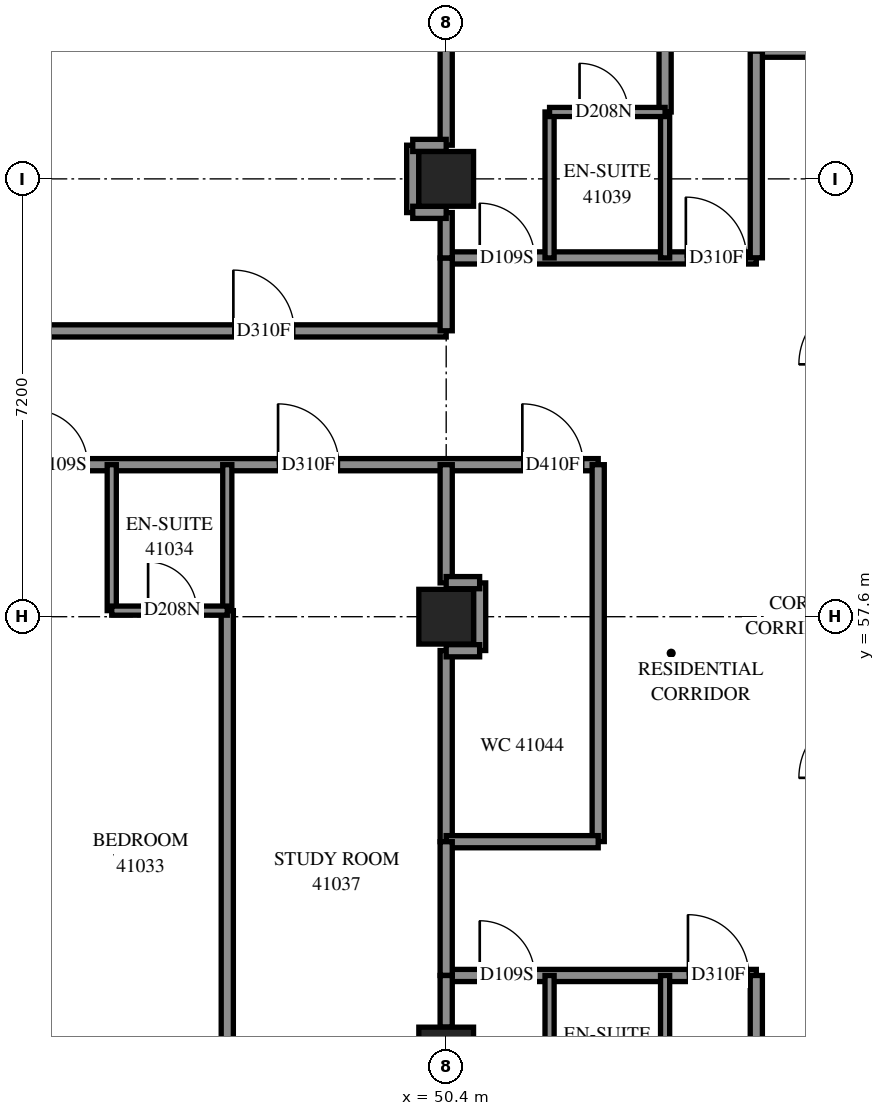
"""IFC4 building model, lengths in metres.
Left out: names, types, materials, properties, quantities, classifications, styles, units other than length and angle.
Written with IfcOpenShell. Run it as: python <this file> out.ifc"""

import sys

from ifc_helpers import new_model, si_unit, direction, frame, frame_2d, origin, origin_2d, place, context, subcontext, project, spatial, rectangle, extrude, element, fill, save


model = new_model("IFC4")
c1 = context("Model", 3, precision=1e-05, world=origin(), true_north=direction((0.0, 1.0)))
c2 = subcontext(c1, "Body", "Model", "MODEL_VIEW")
j1 = project(units=[si_unit("LENGTHUNIT", "METRE"), si_unit("PLANEANGLEUNIT", "RADIAN")], contexts=[c1])
p1 = place(None, origin())
s1 = spatial("IfcSite", under=j1, at=p1, CompositionType="ELEMENT")
p2 = place(p1, origin())
s2 = spatial("IfcBuilding", under=s1, at=p2, CompositionType="ELEMENT")
p3 = place(p2, frame((0.0, 0.0, 152.4)))
s3 = spatial("IfcBuildingStorey", under=s2, at=p3, CompositionType="ELEMENT", Elevation=152.4)
for number, where, z_axis, x_axis in (
    (1, (50.4, 50.4, 0.0), (0.0, 0.0, 1.0), (1.0, 0.0, 0.0)),
    (2, (50.4, 57.6, 0.0), (0.0, 0.0, 1.0), (1.0, 0.0, 0.0)),
    (3, (50.4, 64.8, 0.0), (0.0, 0.0, 1.0), (1.0, 0.0, 0.0)),
):
    element("IfcColumn", number, at=place(p3, frame(where, z_axis=z_axis, x_axis=x_axis)), inside=s3, PredefinedType="COLUMN", context=c2, shape_type="SweptSolid", body=[
        extrude(rectangle(XDim=0.9, YDim=0.9, at=origin_2d()), origin(), (0.0, 0.0, 1.0), 3.1),
    ])
p4 = place(p3, frame((55.5, 66.9, 0.0), z_axis=(0.0, 0.0, 1.0), x_axis=(1.0, 0.0, 0.0)))
e4 = element("IfcWall", 4, at=p4, inside=s3, PredefinedType="PARTITIONING", context=c2, shape_type="SweptSolid", body=[
    extrude(rectangle(XDim=18.6, YDim=0.2, at=frame_2d((9.3, 0.0))), origin(), (0.0, 0.0, 1.0), 3.1),
])
p5 = place(p4, frame((4.4, 0.0, 0.0)))
e5 = element("IfcOpeningElement", 5, at=p5, cuts=e4, PredefinedType="OPENING", context=c2, shape_type="SweptSolid", body=[
    extrude(rectangle(XDim=0.9, YDim=2.1, at=frame_2d((0.45, 1.05))), frame((0.0, 0.11, 0.0), z_axis=(0.0, -1.0, 0.0), x_axis=(1.0, 0.0, 0.0)), (0.0, 0.0, 1.0), 0.22),
])
p6 = place(p4, frame((6.1, 0.0, 0.0)))
e6 = element("IfcOpeningElement", 6, at=p6, cuts=e4, PredefinedType="OPENING", context=c2, shape_type="SweptSolid", body=[
    extrude(rectangle(XDim=0.9, YDim=2.1, at=frame_2d((0.45, 1.05))), frame((0.0, 0.11, 0.0), z_axis=(0.0, -1.0, 0.0), x_axis=(1.0, 0.0, 0.0)), (0.0, 0.0, 1.0), 0.22),
])
p7 = place(p4, frame((11.65, 0.0, 0.0)))
e7 = element("IfcOpeningElement", 7, at=p7, cuts=e4, PredefinedType="OPENING", context=c2, shape_type="SweptSolid", body=[
    extrude(rectangle(XDim=0.9, YDim=2.1, at=frame_2d((0.45, 1.05))), frame((0.0, 0.11, 0.0), z_axis=(0.0, -1.0, 0.0), x_axis=(1.0, 0.0, 0.0)), (0.0, 0.0, 1.0), 0.22),
])
p8 = place(p4, frame((13.3, 0.0, 0.0)))
e8 = element("IfcOpeningElement", 8, at=p8, cuts=e4, PredefinedType="OPENING", context=c2, shape_type="SweptSolid", body=[
    extrude(rectangle(XDim=0.9, YDim=2.1, at=frame_2d((0.45, 1.05))), frame((0.0, 0.11, 0.0), z_axis=(0.0, -1.0, 0.0), x_axis=(1.0, 0.0, 0.0)), (0.0, 0.0, 1.0), 0.22),
])
p9 = place(p3, frame((36.0, 60.1, 0.0), z_axis=(0.0, 0.0, 1.0), x_axis=(1.0, 0.0, 0.0)))
e9 = element("IfcWall", 9, at=p9, inside=s3, PredefinedType="PARTITIONING", context=c2, shape_type="SweptSolid", body=[
    extrude(rectangle(XDim=16.9, YDim=0.2, at=frame_2d((8.45, 0.0))), origin(), (0.0, 0.0, 1.0), 3.1),
])
p10 = place(p9, frame((4.125, 0.0, 0.0)))
e10 = element("IfcOpeningElement", 10, at=p10, cuts=e9, PredefinedType="OPENING", context=c2, shape_type="SweptSolid", body=[
    extrude(rectangle(XDim=1.0, YDim=2.1, at=frame_2d((0.5, 1.05))), frame((0.0, 0.11, 0.0), z_axis=(0.0, -1.0, 0.0), x_axis=(1.0, 0.0, 0.0)), (0.0, 0.0, 1.0), 0.22),
])
p11 = place(p9, frame((7.6, 0.0, 0.0)))
e11 = element("IfcOpeningElement", 11, at=p11, cuts=e9, PredefinedType="OPENING", context=c2, shape_type="SweptSolid", body=[
    extrude(rectangle(XDim=0.9, YDim=2.1, at=frame_2d((0.45, 1.05))), frame((0.0, 0.11, 0.0), z_axis=(0.0, -1.0, 0.0), x_axis=(1.0, 0.0, 0.0)), (0.0, 0.0, 1.0), 0.22),
])
p12 = place(p9, frame((11.635, 0.0, 0.0)))
e12 = element("IfcOpeningElement", 12, at=p12, cuts=e9, PredefinedType="OPENING", context=c2, shape_type="SweptSolid", body=[
    extrude(rectangle(XDim=1.0, YDim=2.1, at=frame_2d((0.5, 1.05))), frame((0.0, 0.11, 0.0), z_axis=(0.0, -1.0, 0.0), x_axis=(1.0, 0.0, 0.0)), (0.0, 0.0, 1.0), 0.22),
])
p13 = place(p9, frame((15.652, 0.0, 0.0)))
e13 = element("IfcOpeningElement", 13, at=p13, cuts=e9, PredefinedType="OPENING", context=c2, shape_type="SweptSolid", body=[
    extrude(rectangle(XDim=1.0, YDim=2.1, at=frame_2d((0.5, 1.05))), frame((0.0, 0.11, 0.0), z_axis=(0.0, -1.0, 0.0), x_axis=(1.0, 0.0, 0.0)), (0.0, 0.0, 1.0), 0.22),
])
p14 = place(p3, frame((40.702, 62.3, 0.0), z_axis=(0.0, 0.0, 1.0), x_axis=(1.0, 0.0, 0.0)))
e14 = element("IfcWall", 14, at=p14, inside=s3, PredefinedType="PARTITIONING", context=c2, shape_type="SweptSolid", body=[
    extrude(rectangle(XDim=9.698, YDim=0.2, at=frame_2d((4.849, 0.0))), origin(), (0.0, 0.0, 1.0), 3.1),
])
p15 = place(p14, frame((6.198, 0.0, 0.0)))
e15 = element("IfcOpeningElement", 15, at=p15, cuts=e14, PredefinedType="OPENING", context=c2, shape_type="SweptSolid", body=[
    extrude(rectangle(XDim=1.0, YDim=2.1, at=frame_2d((0.5, 1.05))), frame((0.0, 0.11, 0.0), z_axis=(0.0, -1.0, 0.0), x_axis=(1.0, 0.0, 0.0)), (0.0, 0.0, 1.0), 0.22),
])
p16 = place(p3, frame((46.8, 49.7, 0.0), z_axis=(0.0, 0.0, 1.0), x_axis=(0.0, 1.0, 0.0)))
e16 = element("IfcWall", 16, at=p16, inside=s3, PredefinedType="PARTITIONING", context=c2, shape_type="SweptSolid", body=[
    extrude(rectangle(XDim=8.0, YDim=0.2, at=frame_2d((4.0, 0.0))), origin(), (0.0, 0.0, 1.0), 3.1),
])
p17 = place(p3, frame((54.0, 65.9, 0.0), z_axis=(0.0, 0.0, 1.0), x_axis=(0.0, 1.0, 0.0)))
e17 = element("IfcWall", 17, at=p17, inside=s3, PredefinedType="PARTITIONING", context=c2, shape_type="SweptSolid", body=[
    extrude(rectangle(XDim=6.851, YDim=0.2, at=frame_2d((3.425, 0.0))), origin(), (0.0, 0.0, 1.0), 3.1),
])
p18 = place(p3, frame((52.9, 53.902, 0.0), z_axis=(0.0, 0.0, 1.0), x_axis=(0.0, 1.0, 0.0)))
e18 = element("IfcWall", 18, at=p18, inside=s3, PredefinedType="PARTITIONING", context=c2, shape_type="SweptSolid", body=[
    extrude(rectangle(XDim=6.198, YDim=0.2, at=frame_2d((3.099, 0.0))), origin(), (0.0, 0.0, 1.0), 3.1),
])
p19 = place(p3, frame((50.4, 65.354, 0.0), z_axis=(0.0, 0.0, 1.0), x_axis=(0.0, 1.0, 0.0)))
e19 = element("IfcWall", 19, at=p19, inside=s3, PredefinedType="PARTITIONING", context=c2, shape_type="SweptSolid", body=[
    extrude(rectangle(XDim=6.092, YDim=0.2, at=frame_2d((3.046, 0.0))), origin(), (0.0, 0.0, 1.0), 3.1),
])
p20 = place(p3, frame((50.4, 51.7, 0.0), z_axis=(0.0, 0.0, 1.0), x_axis=(1.0, 0.0, 0.0)))
e20 = element("IfcWall", 20, at=p20, inside=s3, PredefinedType="PARTITIONING", context=c2, shape_type="SweptSolid", body=[
    extrude(rectangle(XDim=5.1, YDim=0.2, at=frame_2d((2.55, 0.0))), origin(), (0.0, 0.0, 1.0), 3.1),
])
p21 = place(p20, frame((0.552, 0.0, 0.0)))
e21 = element("IfcOpeningElement", 21, at=p21, cuts=e20, PredefinedType="OPENING", context=c2, shape_type="SweptSolid", body=[
    extrude(rectangle(XDim=0.9, YDim=2.1, at=frame_2d((0.45, 1.05))), frame((0.0, 0.11, 0.0), z_axis=(0.0, -1.0, 0.0), x_axis=(1.0, 0.0, 0.0)), (0.0, 0.0, 1.0), 0.22),
])
p22 = place(p20, frame((3.976, 0.0, 0.0)))
e22 = element("IfcOpeningElement", 22, at=p22, cuts=e20, PredefinedType="OPENING", context=c2, shape_type="SweptSolid", body=[
    extrude(rectangle(XDim=1.0, YDim=2.1, at=frame_2d((0.5, 1.05))), frame((0.0, 0.11, 0.0), z_axis=(0.0, -1.0, 0.0), x_axis=(1.0, 0.0, 0.0)), (0.0, 0.0, 1.0), 0.22),
])
p23 = place(p3, frame((50.4, 63.5, 0.0), z_axis=(0.0, 0.0, 1.0), x_axis=(1.0, 0.0, 0.0)))
e23 = element("IfcWall", 23, at=p23, inside=s3, PredefinedType="PARTITIONING", context=c2, shape_type="SweptSolid", body=[
    extrude(rectangle(XDim=5.1, YDim=0.2, at=frame_2d((2.55, 0.0))), origin(), (0.0, 0.0, 1.0), 3.1),
])
p24 = place(p23, frame((0.552, 0.0, 0.0)))
e24 = element("IfcOpeningElement", 24, at=p24, cuts=e23, PredefinedType="OPENING", context=c2, shape_type="SweptSolid", body=[
    extrude(rectangle(XDim=0.9, YDim=2.1, at=frame_2d((0.45, 1.05))), frame((0.0, 0.11, 0.0), z_axis=(0.0, -1.0, 0.0), x_axis=(1.0, 0.0, 0.0)), (0.0, 0.0, 1.0), 0.22),
])
p25 = place(p23, frame((3.941, 0.0, 0.0)))
e25 = element("IfcOpeningElement", 25, at=p25, cuts=e23, PredefinedType="OPENING", context=c2, shape_type="SweptSolid", body=[
    extrude(rectangle(XDim=1.0, YDim=2.1, at=frame_2d((0.5, 1.05))), frame((0.0, 0.11, 0.0), z_axis=(0.0, -1.0, 0.0), x_axis=(1.0, 0.0, 0.0)), (0.0, 0.0, 1.0), 0.22),
])
p26 = place(p3, frame((55.5, 48.3, 0.0), z_axis=(0.0, 0.0, 1.0), x_axis=(0.0, 1.0, 0.0)))
e26 = element("IfcWall", 26, at=p26, inside=s3, PredefinedType="PARTITIONING", context=c2, shape_type="SweptSolid", body=[
    extrude(rectangle(XDim=3.4, YDim=0.2, at=frame_2d((1.7, 0.0))), origin(), (0.0, 0.0, 1.0), 3.1),
])
p27 = place(p3, frame((55.5, 63.502, 0.0), z_axis=(0.0, 0.0, 1.0), x_axis=(0.0, 1.0, 0.0)))
e27 = element("IfcWall", 27, at=p27, inside=s3, PredefinedType="PARTITIONING", context=c2, shape_type="SweptSolid", body=[
    extrude(rectangle(XDim=3.398, YDim=0.2, at=frame_2d((1.699, 0.0))), origin(), (0.0, 0.0, 1.0), 3.1),
])
p28 = place(p3, frame((50.4, 53.9, 0.0), z_axis=(0.0, 0.0, 1.0), x_axis=(0.0, 1.0, 0.0)))
e28 = element("IfcWall", 28, at=p28, inside=s3, PredefinedType="PARTITIONING", context=c2, shape_type="SweptSolid", body=[
    extrude(rectangle(XDim=3.144, YDim=0.2, at=frame_2d((1.572, 0.0))), origin(), (0.0, 0.0, 1.0), 3.1),
])
p29 = place(p3, frame((50.4, 53.9, 0.0), z_axis=(0.0, 0.0, 1.0), x_axis=(1.0, 0.0, 0.0)))
e29 = element("IfcWall", 29, at=p29, inside=s3, PredefinedType="PARTITIONING", context=c2, shape_type="SweptSolid", body=[
    extrude(rectangle(XDim=2.5, YDim=0.2, at=frame_2d((1.25, 0.0))), origin(), (0.0, 0.0, 1.0), 3.1),
])
for number, where, z_axis, x_axis in (
    (30, (52.1, 49.3, 0.0), (0.0, 0.0, 1.0), (0.0, 1.0, 0.0)),
    (31, (52.1, 63.5, 0.0), (0.0, 0.0, 1.0), (0.0, 1.0, 0.0)),
    (32, (54.0, 49.3, 0.0), (0.0, 0.0, 1.0), (0.0, 1.0, 0.0)),
    (33, (54.0, 63.5, 0.0), (0.0, 0.0, 1.0), (0.0, 1.0, 0.0)),
    (34, (44.9, 57.7, 0.0), (0.0, 0.0, 1.0), (0.0, 1.0, 0.0)),
    (35, (46.8, 57.7, 0.0), (0.0, 0.0, 1.0), (0.0, 1.0, 0.0)),
):
    element("IfcWall", number, at=place(p3, frame(where, z_axis=z_axis, x_axis=x_axis)), inside=s3, PredefinedType="PARTITIONING", context=c2, shape_type="SweptSolid", body=[
        extrude(rectangle(XDim=2.4, YDim=0.15, at=frame_2d((1.2, 0.0))), origin(), (0.0, 0.0, 1.0), 3.1),
    ])
p30 = place(p3, frame((50.4, 51.7, 0.0), z_axis=(0.0, 0.0, 1.0), x_axis=(0.0, 1.0, 0.0)))
e36 = element("IfcWall", 36, at=p30, inside=s3, PredefinedType="PARTITIONING", context=c2, shape_type="SweptSolid", body=[
    extrude(rectangle(XDim=2.2, YDim=0.2, at=frame_2d((1.1, 0.0))), origin(), (0.0, 0.0, 1.0), 3.1),
])
p31 = place(p3, frame((50.4, 58.156, 0.0), z_axis=(0.0, 0.0, 1.0), x_axis=(0.0, 1.0, 0.0)))
e37 = element("IfcWall", 37, at=p31, inside=s3, PredefinedType="PARTITIONING", context=c2, shape_type="SweptSolid", body=[
    extrude(rectangle(XDim=1.944, YDim=0.2, at=frame_2d((0.972, 0.0))), origin(), (0.0, 0.0, 1.0), 3.1),
])
p32 = place(p3, frame((44.9, 57.7, 0.0), z_axis=(0.0, 0.0, 1.0), x_axis=(1.0, 0.0, 0.0)))
e38 = element("IfcWall", 38, at=p32, inside=s3, PredefinedType="PARTITIONING", context=c2, shape_type="SweptSolid", body=[
    extrude(rectangle(XDim=1.9, YDim=0.15, at=frame_2d((0.95, 0.0))), origin(), (0.0, 0.0, 1.0), 3.1),
])
p33 = place(p32, frame((0.598, 0.0, 0.0)))
e39 = element("IfcOpeningElement", 39, at=p33, cuts=e38, PredefinedType="OPENING", context=c2, shape_type="SweptSolid", body=[
    extrude(rectangle(XDim=0.8, YDim=2.1, at=frame_2d((0.4, 1.05))), frame((0.0, 0.085, 0.0), z_axis=(0.0, -1.0, 0.0), x_axis=(1.0, 0.0, 0.0)), (0.0, 0.0, 1.0), 0.17),
])
p34 = place(p3, frame((52.1, 65.9, 0.0), z_axis=(0.0, 0.0, 1.0), x_axis=(1.0, 0.0, 0.0)))
e40 = element("IfcWall", 40, at=p34, inside=s3, PredefinedType="PARTITIONING", context=c2, shape_type="SweptSolid", body=[
    extrude(rectangle(XDim=1.9, YDim=0.15, at=frame_2d((0.95, 0.0))), origin(), (0.0, 0.0, 1.0), 3.1),
])
p35 = place(p34, frame((0.493, 0.0, 0.0)))
e41 = element("IfcOpeningElement", 41, at=p35, cuts=e40, PredefinedType="OPENING", context=c2, shape_type="SweptSolid", body=[
    extrude(rectangle(XDim=0.8, YDim=2.1, at=frame_2d((0.4, 1.05))), frame((0.0, 0.085, 0.0), z_axis=(0.0, -1.0, 0.0), x_axis=(1.0, 0.0, 0.0)), (0.0, 0.0, 1.0), 0.17),
])
p36 = place(p3, frame((50.4, 62.302, 0.0), z_axis=(0.0, 0.0, 1.0), x_axis=(0.0, 1.0, 0.0)))
e42 = element("IfcWall", 42, at=p36, inside=s3, PredefinedType="PARTITIONING", context=c2, shape_type="SweptSolid", body=[
    extrude(rectangle(XDim=1.198, YDim=0.2, at=frame_2d((0.599, 0.0))), origin(), (0.0, 0.0, 1.0), 3.1),
])
p37 = place(p3, frame((50.95, 57.044, 0.0), z_axis=(0.0, 0.0, 1.0), x_axis=(0.0, 1.0, 0.0)))
e43 = element("IfcWall", 43, at=p37, inside=s3, PredefinedType="PARTITIONING", context=c2, shape_type="SweptSolid", body=[
    extrude(rectangle(XDim=1.112, YDim=0.2, at=frame_2d((0.556, 0.0))), origin(), (0.0, 0.0, 1.0), 3.1),
])
p38 = place(p3, frame((49.85, 64.246, 0.0), z_axis=(0.0, 0.0, 1.0), x_axis=(0.0, 1.0, 0.0)))
e44 = element("IfcWall", 44, at=p38, inside=s3, PredefinedType="PARTITIONING", context=c2, shape_type="SweptSolid", body=[
    extrude(rectangle(XDim=1.108, YDim=0.2, at=frame_2d((0.554, 0.0))), origin(), (0.0, 0.0, 1.0), 3.1),
])
p39 = place(p3, frame((50.4, 50.85, 0.0), z_axis=(0.0, 0.0, 1.0), x_axis=(0.0, 1.0, 0.0)))
e45 = element("IfcWall", 45, at=p39, inside=s3, PredefinedType="PARTITIONING", context=c2, shape_type="SweptSolid", body=[
    extrude(rectangle(XDim=0.85, YDim=0.2, at=frame_2d((0.425, 0.0))), origin(), (0.0, 0.0, 1.0), 3.1),
])
p40 = place(p3, frame((50.4, 63.5, 0.0), z_axis=(0.0, 0.0, 1.0), x_axis=(0.0, 1.0, 0.0)))
e46 = element("IfcWall", 46, at=p40, inside=s3, PredefinedType="PARTITIONING", context=c2, shape_type="SweptSolid", body=[
    extrude(rectangle(XDim=0.746, YDim=0.2, at=frame_2d((0.373, 0.0))), origin(), (0.0, 0.0, 1.0), 3.1),
])
for number, where, z_axis, x_axis in (
    (47, (50.4, 58.16, 0.0), (0.0, 0.0, 1.0), (1.0, 0.0, 0.0)),
    (48, (50.4, 57.04, 0.0), (0.0, 0.0, 1.0), (1.0, 0.0, 0.0)),
    (49, (49.85, 65.35, 0.0), (0.0, 0.0, 1.0), (1.0, 0.0, 0.0)),
    (50, (49.85, 64.25, 0.0), (0.0, 0.0, 1.0), (1.0, 0.0, 0.0)),
):
    element("IfcWall", number, at=place(p3, frame(where, z_axis=z_axis, x_axis=x_axis)), inside=s3, PredefinedType="PARTITIONING", context=c2, shape_type="SweptSolid", body=[
        extrude(rectangle(XDim=0.55, YDim=0.2, at=frame_2d((0.275, 0.0))), origin(), (0.0, 0.0, 1.0), 3.1),
    ])
p41 = place(p11, origin())
e51 = element("IfcDoor", 51, at=p41, inside=s3, OperationType="SINGLE_SWING_LEFT", PredefinedType="DOOR", context=c2, shape_type="SweptSolid", body=[
    extrude(rectangle(XDim=0.9, YDim=2.1, at=frame_2d((0.45, 1.05))), frame((0.0, 0.025, 0.0), z_axis=(0.0, -1.0, 0.0), x_axis=(1.0, 0.0, 0.0)), (0.0, 0.0, 1.0), 0.05),
])
fill(e11, e51)
p42 = place(p33, origin())
e52 = element("IfcDoor", 52, at=p42, inside=s3, OperationType="SINGLE_SWING_RIGHT", PredefinedType="DOOR", context=c2, shape_type="SweptSolid", body=[
    extrude(rectangle(XDim=0.8, YDim=2.1, at=frame_2d((0.4, 1.05))), frame((0.0, 0.025, 0.0), z_axis=(0.0, -1.0, 0.0), x_axis=(1.0, 0.0, 0.0)), (0.0, 0.0, 1.0), 0.05),
])
fill(e39, e52)
p43 = place(p15, origin())
e53 = element("IfcDoor", 53, at=p43, inside=s3, OperationType="SINGLE_SWING_RIGHT", PredefinedType="DOOR", context=c2, shape_type="SweptSolid", body=[
    extrude(rectangle(XDim=1.0, YDim=2.1, at=frame_2d((0.5, 1.05))), frame((0.0, 0.025, 0.0), z_axis=(0.0, -1.0, 0.0), x_axis=(1.0, 0.0, 0.0)), (0.0, 0.0, 1.0), 0.05),
])
fill(e15, e53)
p44 = place(p12, origin())
e54 = element("IfcDoor", 54, at=p44, inside=s3, OperationType="SINGLE_SWING_RIGHT", PredefinedType="DOOR", context=c2, shape_type="SweptSolid", body=[
    extrude(rectangle(XDim=1.0, YDim=2.1, at=frame_2d((0.5, 1.05))), frame((0.0, 0.025, 0.0), z_axis=(0.0, -1.0, 0.0), x_axis=(1.0, 0.0, 0.0)), (0.0, 0.0, 1.0), 0.05),
])
fill(e12, e54)
p45 = place(p24, origin())
e55 = element("IfcDoor", 55, at=p45, inside=s3, OperationType="SINGLE_SWING_RIGHT", PredefinedType="DOOR", context=c2, shape_type="SweptSolid", body=[
    extrude(rectangle(XDim=0.9, YDim=2.1, at=frame_2d((0.45, 1.05))), frame((0.0, 0.025, 0.0), z_axis=(0.0, -1.0, 0.0), x_axis=(1.0, 0.0, 0.0)), (0.0, 0.0, 1.0), 0.05),
])
fill(e24, e55)
p46 = place(p35, origin())
e56 = element("IfcDoor", 56, at=p46, inside=s3, OperationType="SINGLE_SWING_RIGHT", PredefinedType="DOOR", context=c2, shape_type="SweptSolid", body=[
    extrude(rectangle(XDim=0.8, YDim=2.1, at=frame_2d((0.4, 1.05))), frame((0.0, 0.025, 0.0), z_axis=(0.0, -1.0, 0.0), x_axis=(1.0, 0.0, 0.0)), (0.0, 0.0, 1.0), 0.05),
])
fill(e41, e56)
p47 = place(p25, origin())
e57 = element("IfcDoor", 57, at=p47, inside=s3, OperationType="SINGLE_SWING_LEFT", PredefinedType="DOOR", context=c2, shape_type="SweptSolid", body=[
    extrude(rectangle(XDim=1.0, YDim=2.1, at=frame_2d((0.5, 1.05))), frame((0.0, 0.025, 0.0), z_axis=(0.0, -1.0, 0.0), x_axis=(1.0, 0.0, 0.0)), (0.0, 0.0, 1.0), 0.05),
])
fill(e25, e57)
p48 = place(p13, origin())
e58 = element("IfcDoor", 58, at=p48, inside=s3, OperationType="SINGLE_SWING_LEFT", PredefinedType="DOOR", context=c2, shape_type="SweptSolid", body=[
    extrude(rectangle(XDim=1.0, YDim=2.1, at=frame_2d((0.5, 1.05))), frame((0.0, 0.025, 0.0), z_axis=(0.0, -1.0, 0.0), x_axis=(1.0, 0.0, 0.0)), (0.0, 0.0, 1.0), 0.05),
])
fill(e13, e58)
p49 = place(p21, origin())
e59 = element("IfcDoor", 59, at=p49, inside=s3, OperationType="SINGLE_SWING_LEFT", PredefinedType="DOOR", context=c2, shape_type="SweptSolid", body=[
    extrude(rectangle(XDim=0.9, YDim=2.1, at=frame_2d((0.45, 1.05))), frame((0.0, 0.025, 0.0), z_axis=(0.0, -1.0, 0.0), x_axis=(1.0, 0.0, 0.0)), (0.0, 0.0, 1.0), 0.05),
])
fill(e21, e59)
p50 = place(p22, origin())
e60 = element("IfcDoor", 60, at=p50, inside=s3, OperationType="SINGLE_SWING_RIGHT", PredefinedType="DOOR", context=c2, shape_type="SweptSolid", body=[
    extrude(rectangle(XDim=1.0, YDim=2.1, at=frame_2d((0.5, 1.05))), frame((0.0, 0.025, 0.0), z_axis=(0.0, -1.0, 0.0), x_axis=(1.0, 0.0, 0.0)), (0.0, 0.0, 1.0), 0.05),
])
fill(e22, e60)
save(model, sys.argv[1])
